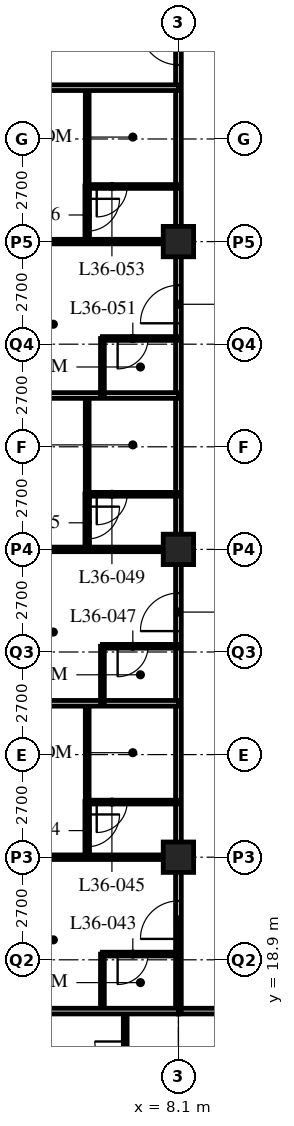
"""IFC4 building model, lengths in metres.
Left out: names, types, materials, properties, quantities, classifications, styles, units other than length and angle.
Written with IfcOpenShell. Run it as: python <this file> out.ifc"""

import sys

from ifc_helpers import new_model, si_unit, direction, frame, frame_2d, origin, origin_2d, place, context, subcontext, project, spatial, rectangle, hollow_rectangle, extrude, element, fill, save


model = new_model("IFC4")
c1 = context("Model", 3, precision=1e-05, world=origin(), true_north=direction((0.0, 1.0)))
c2 = subcontext(c1, "Body", "Model", "MODEL_VIEW")
j1 = project(units=[si_unit("LENGTHUNIT", "METRE"), si_unit("PLANEANGLEUNIT", "RADIAN")], contexts=[c1])
p1 = place(None, origin())
s1 = spatial("IfcSite", under=j1, at=p1, CompositionType="ELEMENT")
p2 = place(p1, origin())
s2 = spatial("IfcBuilding", under=s1, at=p2, CompositionType="ELEMENT")
p3 = place(p2, frame((0.0, 0.0, 140.8)))
s3 = spatial("IfcBuildingStorey", under=s2, at=p3, CompositionType="ELEMENT", Elevation=140.8)
for number, where, z_axis, x_axis in (
    (1, (8.1, 21.6, 0.0), (0.0, 0.0, 1.0), (1.0, 0.0, 0.0)),
    (2, (8.1, 29.7, 0.0), (0.0, 0.0, 1.0), (1.0, 0.0, 0.0)),
    (3, (8.1, 37.8, 0.0), (0.0, 0.0, 1.0), (1.0, 0.0, 0.0)),
):
    element("IfcColumn", number, at=place(p3, frame(where, z_axis=z_axis, x_axis=x_axis)), inside=s3, PredefinedType="COLUMN", context=c2, shape_type="SweptSolid", body=[
        extrude(hollow_rectangle(XDim=0.8, YDim=0.8, WallThickness=0.08, at=origin_2d()), origin(), (0.0, 0.0, 1.0), 3.4),
    ])
p4 = place(p3, frame((8.1, 17.55, 0.0), z_axis=(0.0, 0.0, 1.0), x_axis=(1.0, 0.0, 0.0)))
e4 = element("IfcWall", 4, at=p4, inside=s3, PredefinedType="PARTITIONING", context=c2, shape_type="SweptSolid", body=[
    extrude(rectangle(XDim=36.45, YDim=0.15, at=frame_2d((18.225, 0.0))), origin(), (0.0, 0.0, 1.0), 3.19),
])
p5 = place(p4, frame((9.625, 0.0, 0.0)))
e5 = element("IfcOpeningElement", 5, at=p5, cuts=e4, PredefinedType="OPENING", context=c2, shape_type="SweptSolid", body=[
    extrude(rectangle(XDim=1.0, YDim=2.1, at=frame_2d((0.5, 1.05))), frame((0.0, 0.085, 0.0), z_axis=(0.0, -1.0, 0.0), x_axis=(1.0, 0.0, 0.0)), (0.0, 0.0, 1.0), 0.17),
])
p6 = place(p4, frame((18.1, 0.0, 0.0)))
e6 = element("IfcOpeningElement", 6, at=p6, cuts=e4, PredefinedType="OPENING", context=c2, shape_type="SweptSolid", body=[
    extrude(rectangle(XDim=1.0, YDim=2.1, at=frame_2d((0.5, 1.05))), frame((0.0, 0.085, 0.0), z_axis=(0.0, -1.0, 0.0), x_axis=(1.0, 0.0, 0.0)), (0.0, 0.0, 1.0), 0.17),
])
p7 = place(p4, frame((26.75, 0.0, 0.0)))
e7 = element("IfcOpeningElement", 7, at=p7, cuts=e4, PredefinedType="OPENING", context=c2, shape_type="SweptSolid", body=[
    extrude(rectangle(XDim=1.0, YDim=2.1, at=frame_2d((0.5, 1.05))), frame((0.0, 0.085, 0.0), z_axis=(0.0, -1.0, 0.0), x_axis=(1.0, 0.0, 0.0)), (0.0, 0.0, 1.0), 0.17),
])
p8 = place(p4, frame((30.8, 0.0, 0.0)))
e8 = element("IfcOpeningElement", 8, at=p8, cuts=e4, PredefinedType="OPENING", context=c2, shape_type="SweptSolid", body=[
    extrude(rectangle(XDim=1.0, YDim=2.1, at=frame_2d((0.5, 1.05))), frame((0.0, 0.085, 0.0), z_axis=(0.0, -1.0, 0.0), x_axis=(1.0, 0.0, 0.0)), (0.0, 0.0, 1.0), 0.17),
])
p9 = place(p4, frame((1.525, 0.0, 0.0)))
e9 = element("IfcOpeningElement", 9, at=p9, cuts=e4, PredefinedType="OPENING", context=c2, shape_type="SweptSolid", body=[
    extrude(rectangle(XDim=1.0, YDim=2.1, at=frame_2d((0.5, 1.05))), frame((0.0, 0.085, 0.0), z_axis=(0.0, -1.0, 0.0), x_axis=(1.0, 0.0, 0.0)), (0.0, 0.0, 1.0), 0.17),
])
p10 = place(p4, frame((33.925, 0.0, 0.0)))
e10 = element("IfcOpeningElement", 10, at=p10, cuts=e4, PredefinedType="OPENING", context=c2, shape_type="SweptSolid", body=[
    extrude(rectangle(XDim=1.0, YDim=2.1, at=frame_2d((0.5, 1.05))), frame((0.0, 0.085, 0.0), z_axis=(0.0, -1.0, 0.0), x_axis=(1.0, 0.0, 0.0)), (0.0, 0.0, 1.0), 0.17),
])
p11 = place(p3, frame((8.1, 17.55, 0.0), z_axis=(0.0, 0.0, 1.0), x_axis=(0.0, 1.0, 0.0)))
e11 = element("IfcWall", 11, at=p11, inside=s3, PredefinedType="PARTITIONING", context=c2, shape_type="SweptSolid", body=[
    extrude(rectangle(XDim=28.35, YDim=0.15, at=frame_2d((14.175, 0.0))), origin(), (0.0, 0.0, 1.0), 2.578),
])
p12 = place(p11, frame((1.9, 0.0, 0.0)))
e12 = element("IfcOpeningElement", 12, at=p12, cuts=e11, PredefinedType="OPENING", context=c2, shape_type="SweptSolid", body=[
    extrude(rectangle(XDim=1.0, YDim=2.1, at=frame_2d((0.5, 1.05))), frame((0.0, 0.085, 0.0), z_axis=(0.0, -1.0, 0.0), x_axis=(1.0, 0.0, 0.0)), (0.0, 0.0, 1.0), 0.17),
])
p13 = place(p11, frame((10.0, 0.0, 0.0)))
e13 = element("IfcOpeningElement", 13, at=p13, cuts=e11, PredefinedType="OPENING", context=c2, shape_type="SweptSolid", body=[
    extrude(rectangle(XDim=1.0, YDim=2.1, at=frame_2d((0.5, 1.05))), frame((0.0, 0.085, 0.0), z_axis=(0.0, -1.0, 0.0), x_axis=(1.0, 0.0, 0.0)), (0.0, 0.0, 1.0), 0.17),
])
p14 = place(p11, frame((18.1, 0.0, 0.0)))
e14 = element("IfcOpeningElement", 14, at=p14, cuts=e11, PredefinedType="OPENING", context=c2, shape_type="SweptSolid", body=[
    extrude(rectangle(XDim=1.0, YDim=2.1, at=frame_2d((0.5, 1.05))), frame((0.0, 0.085, 0.0), z_axis=(0.0, -1.0, 0.0), x_axis=(1.0, 0.0, 0.0)), (0.0, 0.0, 1.0), 0.17),
])
p15 = place(p11, frame((24.9, 0.0, 0.0)))
e15 = element("IfcOpeningElement", 15, at=p15, cuts=e11, PredefinedType="OPENING", context=c2, shape_type="SweptSolid", body=[
    extrude(rectangle(XDim=1.0, YDim=2.1, at=frame_2d((0.5, 1.05))), frame((0.0, 0.085, 0.0), z_axis=(0.0, -1.0, 0.0), x_axis=(1.0, 0.0, 0.0)), (0.0, 0.0, 1.0), 0.17),
])
p16 = place(p3, frame((6.1, 17.55, 0.0), z_axis=(0.0, 0.0, 1.0), x_axis=(0.0, 1.0, 0.0)))
e16 = element("IfcWall", 16, at=p16, inside=s3, PredefinedType="PARTITIONING", context=c2, shape_type="SweptSolid", body=[
    extrude(rectangle(XDim=1.5, YDim=0.1, at=frame_2d((0.75, 0.0))), origin(), (0.0, 0.0, 1.0), 3.19),
])
p17 = place(p3, frame((8.1, 19.05, 0.0), z_axis=(0.0, 0.0, 1.0), x_axis=(-1.0, 0.0, 0.0)))
e17 = element("IfcWall", 17, at=p17, inside=s3, PredefinedType="PARTITIONING", context=c2, shape_type="SweptSolid", body=[
    extrude(rectangle(XDim=2.0, YDim=0.1, at=frame_2d((1.0, 0.0))), origin(), (0.0, 0.0, 1.0), 3.19),
])
p18 = place(p17, frame((0.8, 0.0, 0.0)))
e18 = element("IfcOpeningElement", 18, at=p18, cuts=e17, PredefinedType="OPENING", context=c2, shape_type="SweptSolid", body=[
    extrude(rectangle(XDim=0.8, YDim=2.1, at=frame_2d((0.4, 1.05))), frame((0.0, 0.06, 0.0), z_axis=(0.0, -1.0, 0.0), x_axis=(1.0, 0.0, 0.0)), (0.0, 0.0, 1.0), 0.12),
])
p19 = place(p3, frame((5.7, 23.05, 0.0), z_axis=(0.0, 0.0, 1.0), x_axis=(0.0, 1.0, 0.0)))
e19 = element("IfcWall", 19, at=p19, inside=s3, PredefinedType="PARTITIONING", context=c2, shape_type="SweptSolid", body=[
    extrude(rectangle(XDim=2.6, YDim=0.1, at=frame_2d((1.3, 0.0))), origin(), (0.0, 0.0, 1.0), 3.19),
])
p20 = place(p3, frame((8.1, 23.05, 0.0), z_axis=(0.0, 0.0, 1.0), x_axis=(-1.0, 0.0, 0.0)))
e20 = element("IfcWall", 20, at=p20, inside=s3, PredefinedType="PARTITIONING", context=c2, shape_type="SweptSolid", body=[
    extrude(rectangle(XDim=2.4, YDim=0.1, at=frame_2d((1.2, 0.0))), origin(), (0.0, 0.0, 1.0), 3.19),
])
p21 = place(p20, frame((1.35, 0.0, 0.0)))
e21 = element("IfcOpeningElement", 21, at=p21, cuts=e20, PredefinedType="OPENING", context=c2, shape_type="SweptSolid", body=[
    extrude(rectangle(XDim=0.8, YDim=2.1, at=frame_2d((0.4, 1.05))), frame((0.0, 0.06, 0.0), z_axis=(0.0, -1.0, 0.0), x_axis=(1.0, 0.0, 0.0)), (0.0, 0.0, 1.0), 0.12),
])
p22 = place(p3, frame((8.1, 21.6, 0.0), z_axis=(0.0, 0.0, 1.0), x_axis=(-1.0, 0.0, 0.0)))
e22 = element("IfcWall", 22, at=p22, inside=s3, PredefinedType="PARTITIONING", context=c2, shape_type="SweptSolid", body=[
    extrude(rectangle(XDim=7.8, YDim=0.12, at=frame_2d((3.9, 0.0))), origin(), (0.0, 0.0, 1.0), 2.578),
])
p23 = place(p22, frame((4.825, 0.0, 0.0)))
e23 = element("IfcOpeningElement", 23, at=p23, cuts=e22, PredefinedType="OPENING", context=c2, shape_type="SweptSolid", body=[
    extrude(rectangle(XDim=0.85, YDim=2.1, at=frame_2d((0.425, 1.05))), frame((0.0, 0.07, 0.0), z_axis=(0.0, -1.0, 0.0), x_axis=(1.0, 0.0, 0.0)), (0.0, 0.0, 1.0), 0.14),
])
p24 = place(p3, frame((8.1, 25.65, 0.0), z_axis=(0.0, 0.0, 1.0), x_axis=(-1.0, 0.0, 0.0)))
e24 = element("IfcWall", 24, at=p24, inside=s3, PredefinedType="PARTITIONING", context=c2, shape_type="SweptSolid", body=[
    extrude(rectangle(XDim=7.8, YDim=0.15, at=frame_2d((3.9, 0.0))), origin(), (0.0, 0.0, 1.0), 3.19),
])
p25 = place(p3, frame((6.1, 25.65, 0.0), z_axis=(0.0, 0.0, 1.0), x_axis=(0.0, 1.0, 0.0)))
e25 = element("IfcWall", 25, at=p25, inside=s3, PredefinedType="PARTITIONING", context=c2, shape_type="SweptSolid", body=[
    extrude(rectangle(XDim=1.5, YDim=0.1, at=frame_2d((0.75, 0.0))), origin(), (0.0, 0.0, 1.0), 3.19),
])
p26 = place(p3, frame((8.1, 27.15, 0.0), z_axis=(0.0, 0.0, 1.0), x_axis=(-1.0, 0.0, 0.0)))
e26 = element("IfcWall", 26, at=p26, inside=s3, PredefinedType="PARTITIONING", context=c2, shape_type="SweptSolid", body=[
    extrude(rectangle(XDim=2.0, YDim=0.1, at=frame_2d((1.0, 0.0))), origin(), (0.0, 0.0, 1.0), 3.19),
])
p27 = place(p26, frame((0.8, 0.0, 0.0)))
e27 = element("IfcOpeningElement", 27, at=p27, cuts=e26, PredefinedType="OPENING", context=c2, shape_type="SweptSolid", body=[
    extrude(rectangle(XDim=0.8, YDim=2.1, at=frame_2d((0.4, 1.05))), frame((0.0, 0.06, 0.0), z_axis=(0.0, -1.0, 0.0), x_axis=(1.0, 0.0, 0.0)), (0.0, 0.0, 1.0), 0.12),
])
p28 = place(p3, frame((5.7, 31.15, 0.0), z_axis=(0.0, 0.0, 1.0), x_axis=(0.0, 1.0, 0.0)))
e28 = element("IfcWall", 28, at=p28, inside=s3, PredefinedType="PARTITIONING", context=c2, shape_type="SweptSolid", body=[
    extrude(rectangle(XDim=2.6, YDim=0.1, at=frame_2d((1.3, 0.0))), origin(), (0.0, 0.0, 1.0), 3.19),
])
p29 = place(p3, frame((8.1, 31.15, 0.0), z_axis=(0.0, 0.0, 1.0), x_axis=(-1.0, 0.0, 0.0)))
e29 = element("IfcWall", 29, at=p29, inside=s3, PredefinedType="PARTITIONING", context=c2, shape_type="SweptSolid", body=[
    extrude(rectangle(XDim=2.4, YDim=0.1, at=frame_2d((1.2, 0.0))), origin(), (0.0, 0.0, 1.0), 3.19),
])
p30 = place(p29, frame((1.35, 0.0, 0.0)))
e30 = element("IfcOpeningElement", 30, at=p30, cuts=e29, PredefinedType="OPENING", context=c2, shape_type="SweptSolid", body=[
    extrude(rectangle(XDim=0.8, YDim=2.1, at=frame_2d((0.4, 1.05))), frame((0.0, 0.06, 0.0), z_axis=(0.0, -1.0, 0.0), x_axis=(1.0, 0.0, 0.0)), (0.0, 0.0, 1.0), 0.12),
])
p31 = place(p3, frame((8.1, 29.7, 0.0), z_axis=(0.0, 0.0, 1.0), x_axis=(-1.0, 0.0, 0.0)))
e31 = element("IfcWall", 31, at=p31, inside=s3, PredefinedType="PARTITIONING", context=c2, shape_type="SweptSolid", body=[
    extrude(rectangle(XDim=7.8, YDim=0.12, at=frame_2d((3.9, 0.0))), origin(), (0.0, 0.0, 1.0), 2.578),
])
p32 = place(p31, frame((4.825, 0.0, 0.0)))
e32 = element("IfcOpeningElement", 32, at=p32, cuts=e31, PredefinedType="OPENING", context=c2, shape_type="SweptSolid", body=[
    extrude(rectangle(XDim=0.85, YDim=2.1, at=frame_2d((0.425, 1.05))), frame((0.0, 0.07, 0.0), z_axis=(0.0, -1.0, 0.0), x_axis=(1.0, 0.0, 0.0)), (0.0, 0.0, 1.0), 0.14),
])
p33 = place(p3, frame((8.1, 33.75, 0.0), z_axis=(0.0, 0.0, 1.0), x_axis=(-1.0, 0.0, 0.0)))
e33 = element("IfcWall", 33, at=p33, inside=s3, PredefinedType="PARTITIONING", context=c2, shape_type="SweptSolid", body=[
    extrude(rectangle(XDim=7.8, YDim=0.15, at=frame_2d((3.9, 0.0))), origin(), (0.0, 0.0, 1.0), 3.19),
])
p34 = place(p3, frame((6.1, 33.75, 0.0), z_axis=(0.0, 0.0, 1.0), x_axis=(0.0, 1.0, 0.0)))
e34 = element("IfcWall", 34, at=p34, inside=s3, PredefinedType="PARTITIONING", context=c2, shape_type="SweptSolid", body=[
    extrude(rectangle(XDim=1.5, YDim=0.1, at=frame_2d((0.75, 0.0))), origin(), (0.0, 0.0, 1.0), 3.19),
])
p35 = place(p3, frame((8.1, 35.25, 0.0), z_axis=(0.0, 0.0, 1.0), x_axis=(-1.0, 0.0, 0.0)))
e35 = element("IfcWall", 35, at=p35, inside=s3, PredefinedType="PARTITIONING", context=c2, shape_type="SweptSolid", body=[
    extrude(rectangle(XDim=2.0, YDim=0.1, at=frame_2d((1.0, 0.0))), origin(), (0.0, 0.0, 1.0), 3.19),
])
p36 = place(p35, frame((0.8, 0.0, 0.0)))
e36 = element("IfcOpeningElement", 36, at=p36, cuts=e35, PredefinedType="OPENING", context=c2, shape_type="SweptSolid", body=[
    extrude(rectangle(XDim=0.8, YDim=2.1, at=frame_2d((0.4, 1.05))), frame((0.0, 0.06, 0.0), z_axis=(0.0, -1.0, 0.0), x_axis=(1.0, 0.0, 0.0)), (0.0, 0.0, 1.0), 0.12),
])
p37 = place(p3, frame((5.7, 39.25, 0.0), z_axis=(0.0, 0.0, 1.0), x_axis=(0.0, 1.0, 0.0)))
e37 = element("IfcWall", 37, at=p37, inside=s3, PredefinedType="PARTITIONING", context=c2, shape_type="SweptSolid", body=[
    extrude(rectangle(XDim=2.6, YDim=0.1, at=frame_2d((1.3, 0.0))), origin(), (0.0, 0.0, 1.0), 3.19),
])
p38 = place(p3, frame((8.1, 39.25, 0.0), z_axis=(0.0, 0.0, 1.0), x_axis=(-1.0, 0.0, 0.0)))
e38 = element("IfcWall", 38, at=p38, inside=s3, PredefinedType="PARTITIONING", context=c2, shape_type="SweptSolid", body=[
    extrude(rectangle(XDim=2.4, YDim=0.1, at=frame_2d((1.2, 0.0))), origin(), (0.0, 0.0, 1.0), 3.19),
])
p39 = place(p38, frame((1.35, 0.0, 0.0)))
e39 = element("IfcOpeningElement", 39, at=p39, cuts=e38, PredefinedType="OPENING", context=c2, shape_type="SweptSolid", body=[
    extrude(rectangle(XDim=0.8, YDim=2.1, at=frame_2d((0.4, 1.05))), frame((0.0, 0.06, 0.0), z_axis=(0.0, -1.0, 0.0), x_axis=(1.0, 0.0, 0.0)), (0.0, 0.0, 1.0), 0.12),
])
p40 = place(p3, frame((8.1, 37.8, 0.0), z_axis=(0.0, 0.0, 1.0), x_axis=(-1.0, 0.0, 0.0)))
e40 = element("IfcWall", 40, at=p40, inside=s3, PredefinedType="PARTITIONING", context=c2, shape_type="SweptSolid", body=[
    extrude(rectangle(XDim=7.8, YDim=0.12, at=frame_2d((3.9, 0.0))), origin(), (0.0, 0.0, 1.0), 2.578),
])
p41 = place(p40, frame((4.825, 0.0, 0.0)))
e41 = element("IfcOpeningElement", 41, at=p41, cuts=e40, PredefinedType="OPENING", context=c2, shape_type="SweptSolid", body=[
    extrude(rectangle(XDim=0.85, YDim=2.1, at=frame_2d((0.425, 1.05))), frame((0.0, 0.07, 0.0), z_axis=(0.0, -1.0, 0.0), x_axis=(1.0, 0.0, 0.0)), (0.0, 0.0, 1.0), 0.14),
])
p42 = place(p3, frame((8.1, 41.85, 0.0), z_axis=(0.0, 0.0, 1.0), x_axis=(-1.0, 0.0, 0.0)))
e42 = element("IfcWall", 42, at=p42, inside=s3, PredefinedType="PARTITIONING", context=c2, shape_type="SweptSolid", body=[
    extrude(rectangle(XDim=7.8, YDim=0.15, at=frame_2d((3.9, 0.0))), origin(), (0.0, 0.0, 1.0), 3.19),
])
p43 = place(p3, frame((6.7, 17.55, 0.0), z_axis=(0.0, 0.0, 1.0), x_axis=(0.0, -1.0, 0.0)))
e43 = element("IfcWall", 43, at=p43, inside=s3, PredefinedType="PARTITIONING", context=c2, shape_type="SweptSolid", body=[
    extrude(rectangle(XDim=2.4, YDim=0.1, at=frame_2d((1.2, 0.0))), origin(), (0.0, 0.0, 1.0), 3.19),
])
p44 = place(p43, frame((0.8, 0.0, 0.0)))
e44 = element("IfcOpeningElement", 44, at=p44, cuts=e43, PredefinedType="OPENING", context=c2, shape_type="SweptSolid", body=[
    extrude(rectangle(XDim=0.8, YDim=2.1, at=frame_2d((0.4, 1.05))), frame((0.0, 0.06, 0.0), z_axis=(0.0, -1.0, 0.0), x_axis=(1.0, 0.0, 0.0)), (0.0, 0.0, 1.0), 0.12),
])
p45 = place(p3, frame((0.3, 17.55, 0.0), z_axis=(0.0, 0.0, 1.0), x_axis=(1.0, 0.0, 0.0)))
e45 = element("IfcWall", 45, at=p45, inside=s3, PredefinedType="PARTITIONING", context=c2, shape_type="SweptSolid", body=[
    extrude(rectangle(XDim=7.8, YDim=0.15, at=frame_2d((3.9, 0.0))), origin(), (0.0, 0.0, 1.0), 3.19),
])
p46 = place(p3, frame((5.7, 21.6, 0.0), z_axis=(0.0, 0.0, 1.0), x_axis=(0.0, 1.0, 0.0)))
e46 = element("IfcWall", 46, at=p46, inside=s3, PredefinedType="PARTITIONING", context=c2, shape_type="SweptSolid", body=[
    extrude(rectangle(XDim=1.46, YDim=0.12, at=frame_2d((0.73, 0.0))), origin(), (0.0, 0.0, 1.0), 3.19),
])
p47 = place(p46, frame((0.275, 0.0, 0.0)))
e47 = element("IfcOpeningElement", 47, at=p47, cuts=e46, PredefinedType="OPENING", context=c2, shape_type="SweptSolid", body=[
    extrude(rectangle(XDim=0.85, YDim=2.1, at=frame_2d((0.425, 1.05))), frame((0.0, 0.07, 0.0), z_axis=(0.0, -1.0, 0.0), x_axis=(1.0, 0.0, 0.0)), (0.0, 0.0, 1.0), 0.14),
])
p48 = place(p3, frame((5.7, 29.7, 0.0), z_axis=(0.0, 0.0, 1.0), x_axis=(0.0, 1.0, 0.0)))
e48 = element("IfcWall", 48, at=p48, inside=s3, PredefinedType="PARTITIONING", context=c2, shape_type="SweptSolid", body=[
    extrude(rectangle(XDim=1.46, YDim=0.12, at=frame_2d((0.73, 0.0))), origin(), (0.0, 0.0, 1.0), 3.19),
])
p49 = place(p48, frame((0.275, 0.0, 0.0)))
e49 = element("IfcOpeningElement", 49, at=p49, cuts=e48, PredefinedType="OPENING", context=c2, shape_type="SweptSolid", body=[
    extrude(rectangle(XDim=0.85, YDim=2.1, at=frame_2d((0.425, 1.05))), frame((0.0, 0.07, 0.0), z_axis=(0.0, -1.0, 0.0), x_axis=(1.0, 0.0, 0.0)), (0.0, 0.0, 1.0), 0.14),
])
p50 = place(p3, frame((5.7, 37.8, 0.0), z_axis=(0.0, 0.0, 1.0), x_axis=(0.0, 1.0, 0.0)))
e50 = element("IfcWall", 50, at=p50, inside=s3, PredefinedType="PARTITIONING", context=c2, shape_type="SweptSolid", body=[
    extrude(rectangle(XDim=1.46, YDim=0.12, at=frame_2d((0.73, 0.0))), origin(), (0.0, 0.0, 1.0), 3.19),
])
p51 = place(p50, frame((0.275, 0.0, 0.0)))
e51 = element("IfcOpeningElement", 51, at=p51, cuts=e50, PredefinedType="OPENING", context=c2, shape_type="SweptSolid", body=[
    extrude(rectangle(XDim=0.85, YDim=2.1, at=frame_2d((0.425, 1.05))), frame((0.0, 0.07, 0.0), z_axis=(0.0, -1.0, 0.0), x_axis=(1.0, 0.0, 0.0)), (0.0, 0.0, 1.0), 0.14),
])
p52 = place(p18, origin())
e52 = element("IfcDoor", 52, at=p52, inside=s3, OperationType="SINGLE_SWING_RIGHT", PredefinedType="DOOR", context=c2, shape_type="SweptSolid", body=[
    extrude(rectangle(XDim=0.8, YDim=2.1, at=frame_2d((0.4, 1.05))), frame((0.0, 0.025, 0.0), z_axis=(0.0, -1.0, 0.0), x_axis=(1.0, 0.0, 0.0)), (0.0, 0.0, 1.0), 0.05),
])
fill(e18, e52)
p53 = place(p12, origin())
e53 = element("IfcDoor", 53, at=p53, inside=s3, OperationType="SINGLE_SWING_LEFT", PredefinedType="DOOR", context=c2, shape_type="SweptSolid", body=[
    extrude(rectangle(XDim=1.0, YDim=2.1, at=frame_2d((0.5, 1.05))), frame((0.0, 0.025, 0.0), z_axis=(0.0, -1.0, 0.0), x_axis=(1.0, 0.0, 0.0)), (0.0, 0.0, 1.0), 0.05),
])
fill(e12, e53)
p54 = place(p21, origin())
e54 = element("IfcDoor", 54, at=p54, inside=s3, OperationType="SINGLE_SWING_RIGHT", PredefinedType="DOOR", context=c2, shape_type="SweptSolid", body=[
    extrude(rectangle(XDim=0.8, YDim=2.1, at=frame_2d((0.4, 1.05))), frame((0.0, 0.025, 0.0), z_axis=(0.0, -1.0, 0.0), x_axis=(1.0, 0.0, 0.0)), (0.0, 0.0, 1.0), 0.05),
])
fill(e21, e54)
p55 = place(p27, origin())
e55 = element("IfcDoor", 55, at=p55, inside=s3, OperationType="SINGLE_SWING_RIGHT", PredefinedType="DOOR", context=c2, shape_type="SweptSolid", body=[
    extrude(rectangle(XDim=0.8, YDim=2.1, at=frame_2d((0.4, 1.05))), frame((0.0, 0.025, 0.0), z_axis=(0.0, -1.0, 0.0), x_axis=(1.0, 0.0, 0.0)), (0.0, 0.0, 1.0), 0.05),
])
fill(e27, e55)
p56 = place(p13, origin())
e56 = element("IfcDoor", 56, at=p56, inside=s3, OperationType="SINGLE_SWING_LEFT", PredefinedType="DOOR", context=c2, shape_type="SweptSolid", body=[
    extrude(rectangle(XDim=1.0, YDim=2.1, at=frame_2d((0.5, 1.05))), frame((0.0, 0.025, 0.0), z_axis=(0.0, -1.0, 0.0), x_axis=(1.0, 0.0, 0.0)), (0.0, 0.0, 1.0), 0.05),
])
fill(e13, e56)
p57 = place(p30, origin())
e57 = element("IfcDoor", 57, at=p57, inside=s3, OperationType="SINGLE_SWING_RIGHT", PredefinedType="DOOR", context=c2, shape_type="SweptSolid", body=[
    extrude(rectangle(XDim=0.8, YDim=2.1, at=frame_2d((0.4, 1.05))), frame((0.0, 0.025, 0.0), z_axis=(0.0, -1.0, 0.0), x_axis=(1.0, 0.0, 0.0)), (0.0, 0.0, 1.0), 0.05),
])
fill(e30, e57)
p58 = place(p36, origin())
e58 = element("IfcDoor", 58, at=p58, inside=s3, OperationType="SINGLE_SWING_RIGHT", PredefinedType="DOOR", context=c2, shape_type="SweptSolid", body=[
    extrude(rectangle(XDim=0.8, YDim=2.1, at=frame_2d((0.4, 1.05))), frame((0.0, 0.025, 0.0), z_axis=(0.0, -1.0, 0.0), x_axis=(1.0, 0.0, 0.0)), (0.0, 0.0, 1.0), 0.05),
])
fill(e36, e58)
p59 = place(p14, origin())
e59 = element("IfcDoor", 59, at=p59, inside=s3, OperationType="SINGLE_SWING_LEFT", PredefinedType="DOOR", context=c2, shape_type="SweptSolid", body=[
    extrude(rectangle(XDim=1.0, YDim=2.1, at=frame_2d((0.5, 1.05))), frame((0.0, 0.025, 0.0), z_axis=(0.0, -1.0, 0.0), x_axis=(1.0, 0.0, 0.0)), (0.0, 0.0, 1.0), 0.05),
])
fill(e14, e59)
p60 = place(p39, origin())
e60 = element("IfcDoor", 60, at=p60, inside=s3, OperationType="SINGLE_SWING_RIGHT", PredefinedType="DOOR", context=c2, shape_type="SweptSolid", body=[
    extrude(rectangle(XDim=0.8, YDim=2.1, at=frame_2d((0.4, 1.05))), frame((0.0, 0.025, 0.0), z_axis=(0.0, -1.0, 0.0), x_axis=(1.0, 0.0, 0.0)), (0.0, 0.0, 1.0), 0.05),
])
fill(e39, e60)
p61 = place(p15, origin())
e61 = element("IfcDoor", 61, at=p61, inside=s3, OperationType="SINGLE_SWING_RIGHT", PredefinedType="DOOR", context=c2, shape_type="SweptSolid", body=[
    extrude(rectangle(XDim=1.0, YDim=2.1, at=frame_2d((0.5, 1.05))), frame((0.0, 0.025, 0.0), z_axis=(0.0, -1.0, 0.0), x_axis=(1.0, 0.0, 0.0)), (0.0, 0.0, 1.0), 0.05),
])
fill(e15, e61)
p62 = place(p44, origin())
e62 = element("IfcDoor", 62, at=p62, inside=s3, OperationType="SINGLE_SWING_RIGHT", PredefinedType="DOOR", context=c2, shape_type="SweptSolid", body=[
    extrude(rectangle(XDim=0.8, YDim=2.1, at=frame_2d((0.4, 1.05))), frame((0.0, 0.025, 0.0), z_axis=(0.0, -1.0, 0.0), x_axis=(1.0, 0.0, 0.0)), (0.0, 0.0, 1.0), 0.05),
])
fill(e44, e62)
p63 = place(p47, origin())
e63 = element("IfcDoor", 63, at=p63, inside=s3, OperationType="SINGLE_SWING_LEFT", PredefinedType="DOOR", context=c2, shape_type="SweptSolid", body=[
    extrude(rectangle(XDim=0.85, YDim=2.1, at=frame_2d((0.425, 1.05))), frame((0.0, 0.025, 0.0), z_axis=(0.0, -1.0, 0.0), x_axis=(1.0, 0.0, 0.0)), (0.0, 0.0, 1.0), 0.05),
])
fill(e47, e63)
p64 = place(p49, origin())
e64 = element("IfcDoor", 64, at=p64, inside=s3, OperationType="SINGLE_SWING_LEFT", PredefinedType="DOOR", context=c2, shape_type="SweptSolid", body=[
    extrude(rectangle(XDim=0.85, YDim=2.1, at=frame_2d((0.425, 1.05))), frame((0.0, 0.025, 0.0), z_axis=(0.0, -1.0, 0.0), x_axis=(1.0, 0.0, 0.0)), (0.0, 0.0, 1.0), 0.05),
])
fill(e49, e64)
p65 = place(p51, origin())
e65 = element("IfcDoor", 65, at=p65, inside=s3, OperationType="SINGLE_SWING_LEFT", PredefinedType="DOOR", context=c2, shape_type="SweptSolid", body=[
    extrude(rectangle(XDim=0.85, YDim=2.1, at=frame_2d((0.425, 1.05))), frame((0.0, 0.025, 0.0), z_axis=(0.0, -1.0, 0.0), x_axis=(1.0, 0.0, 0.0)), (0.0, 0.0, 1.0), 0.05),
])
fill(e51, e65)
save(model, sys.argv[1])
